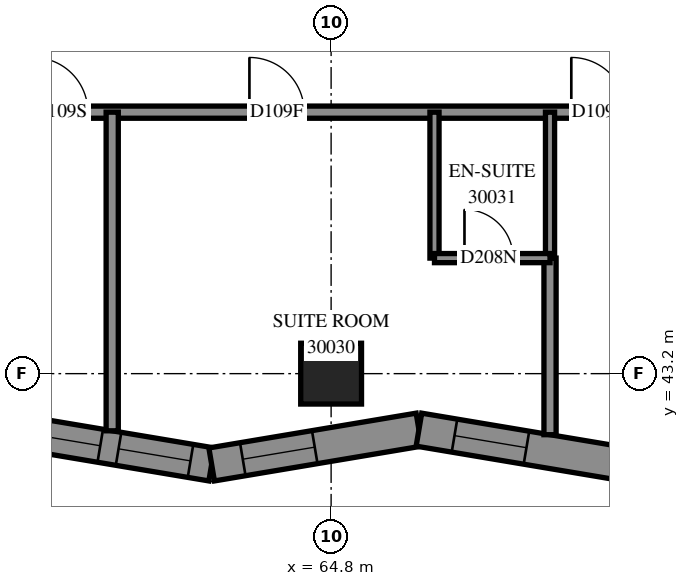
"""IFC4 building model, lengths in metres.
Left out: names, types, materials, properties, quantities, classifications, styles, units other than length and angle.
Written with IfcOpenShell. Run it as: python <this file> out.ifc"""

import sys

from ifc_helpers import new_model, si_unit, direction, frame, frame_2d, origin, origin_2d, place, context, subcontext, project, spatial, polyline, rectangle, outline, extrude, element, fill, save


model = new_model("IFC4")
c1 = context("Model", 3, precision=1e-05, world=origin(), true_north=direction((0.0, 1.0)))
c2 = subcontext(c1, "Body", "Model", "MODEL_VIEW")
j1 = project(units=[si_unit("LENGTHUNIT", "METRE"), si_unit("PLANEANGLEUNIT", "RADIAN")], contexts=[c1])
p1 = place(None, origin())
s1 = spatial("IfcSite", under=j1, at=p1, CompositionType="ELEMENT")
p2 = place(p1, origin())
s2 = spatial("IfcBuilding", under=s1, at=p2, CompositionType="ELEMENT")
p3 = place(p2, frame((0.0, 0.0, 111.8)))
s3 = spatial("IfcBuildingStorey", under=s2, at=p3, CompositionType="ELEMENT", Elevation=111.8)
p4 = place(p3, frame((64.8, 43.2, 0.0), z_axis=(0.0, 0.0, 1.0), x_axis=(1.0, 0.0, 0.0)))
e1 = element("IfcColumn", 1, at=p4, inside=s3, PredefinedType="COLUMN", context=c2, shape_type="SweptSolid", body=[
    extrude(rectangle(XDim=1.0, YDim=1.0, at=origin_2d()), origin(), (0.0, 0.0, 1.0), 3.1),
])
p5 = place(p3, frame((59.426, 42.279, 0.0), z_axis=(0.0, 0.0, 1.0), x_axis=(0.9862119159, -0.1654873316, 0.0)))
e2 = element("IfcWall", 2, at=p5, inside=s3, PredefinedType="SOLIDWALL", context=c2, shape_type="SweptSolid", body=[
    extrude(outline(polyline([(0.046, -0.275), (3.503, -0.275), (3.41, 0.275), (-0.046, 0.275), (0.046, -0.275)])), origin(), (0.0, 0.0, 1.0), 3.1),
])
p6 = place(p5, frame((0.399, 0.0, 0.5)))
e3 = element("IfcOpeningElement", 3, at=p6, cuts=e2, PredefinedType="OPENING", context=c2, shape_type="SweptSolid", body=[
    extrude(rectangle(XDim=1.2, YDim=2.45, at=frame_2d((0.6, 1.225))), frame((0.0, 0.285, 0.0), z_axis=(0.0, -1.0, 0.0), x_axis=(1.0, 0.0, 0.0)), (0.0, 0.0, 1.0), 0.57),
])
p7 = place(p5, frame((1.904, 0.0, 0.5)))
e4 = element("IfcOpeningElement", 4, at=p7, cuts=e2, PredefinedType="OPENING", context=c2, shape_type="SweptSolid", body=[
    extrude(rectangle(XDim=1.2, YDim=2.45, at=frame_2d((0.6, 1.225))), frame((0.0, 0.285, 0.0), z_axis=(0.0, -1.0, 0.0), x_axis=(1.0, 0.0, 0.0)), (0.0, 0.0, 1.0), 0.57),
])
p8 = place(p3, frame((62.835, 41.707, 0.0), z_axis=(0.0, 0.0, 1.0), x_axis=(0.9862119159, 0.1654873316, 0.0)))
e5 = element("IfcWall", 5, at=p8, inside=s3, PredefinedType="SOLIDWALL", context=c2, shape_type="SweptSolid", body=[
    extrude(outline(polyline([(-0.046, -0.275), (3.41, -0.275), (3.503, 0.275), (0.046, 0.275), (-0.046, -0.275)])), origin(), (0.0, 0.0, 1.0), 3.1),
])
p9 = place(p8, frame((0.519, 0.0, 0.5)))
e6 = element("IfcOpeningElement", 6, at=p9, cuts=e5, PredefinedType="OPENING", context=c2, shape_type="SweptSolid", body=[
    extrude(rectangle(XDim=1.2, YDim=2.45, at=frame_2d((0.6, 1.225))), frame((0.0, 0.285, 0.0), z_axis=(0.0, -1.0, 0.0), x_axis=(1.0, 0.0, 0.0)), (0.0, 0.0, 1.0), 0.57),
])
p10 = place(p3, frame((66.244, 42.279, 0.0), z_axis=(0.0, 0.0, 1.0), x_axis=(0.9862119159, -0.1654873316, 0.0)))
e7 = element("IfcWall", 7, at=p10, inside=s3, PredefinedType="SOLIDWALL", context=c2, shape_type="SweptSolid", body=[
    extrude(outline(polyline([(0.046, -0.275), (3.503, -0.275), (3.41, 0.275), (-0.046, 0.275), (0.046, -0.275)])), origin(), (0.0, 0.0, 1.0), 3.1),
])
p11 = place(p10, frame((0.593, 0.0, 0.5)))
e8 = element("IfcOpeningElement", 8, at=p11, cuts=e7, PredefinedType="OPENING", context=c2, shape_type="SweptSolid", body=[
    extrude(rectangle(XDim=1.2, YDim=2.45, at=frame_2d((0.6, 1.225))), frame((0.0, 0.285, 0.0), z_axis=(0.0, -1.0, 0.0), x_axis=(1.0, 0.0, 0.0)), (0.0, 0.0, 1.0), 0.57),
])
p12 = place(p3, frame((54.7, 47.5, 0.0), z_axis=(0.0, 0.0, 1.0), x_axis=(1.0, 0.0, 0.0)))
e9 = element("IfcWall", 9, at=p12, inside=s3, PredefinedType="PARTITIONING", context=c2, shape_type="SweptSolid", body=[
    extrude(rectangle(XDim=19.442, YDim=0.2, at=frame_2d((9.721, 0.0))), origin(), (0.0, 0.0, 1.0), 3.1),
])
p13 = place(p12, frame((5.2, 0.0, 0.0)))
e10 = element("IfcOpeningElement", 10, at=p13, cuts=e9, PredefinedType="OPENING", context=c2, shape_type="SweptSolid", body=[
    extrude(rectangle(XDim=0.9, YDim=2.1, at=frame_2d((0.45, 1.05))), frame((0.0, 0.11, 0.0), z_axis=(0.0, -1.0, 0.0), x_axis=(1.0, 0.0, 0.0)), (0.0, 0.0, 1.0), 0.22),
])
p14 = place(p12, frame((8.757, 0.0, 0.0)))
e11 = element("IfcOpeningElement", 11, at=p14, cuts=e9, PredefinedType="OPENING", context=c2, shape_type="SweptSolid", body=[
    extrude(rectangle(XDim=0.9, YDim=2.1, at=frame_2d((0.45, 1.05))), frame((0.0, 0.11, 0.0), z_axis=(0.0, -1.0, 0.0), x_axis=(1.0, 0.0, 0.0)), (0.0, 0.0, 1.0), 0.22),
])
p15 = place(p12, frame((14.05, 0.0, 0.0)))
e12 = element("IfcOpeningElement", 12, at=p15, cuts=e9, PredefinedType="OPENING", context=c2, shape_type="SweptSolid", body=[
    extrude(rectangle(XDim=0.9, YDim=2.1, at=frame_2d((0.45, 1.05))), frame((0.0, 0.11, 0.0), z_axis=(0.0, -1.0, 0.0), x_axis=(1.0, 0.0, 0.0)), (0.0, 0.0, 1.0), 0.22),
])
p16 = place(p3, frame((61.2, 42.26, 0.0), z_axis=(0.0, 0.0, 1.0), x_axis=(0.0, 1.0, 0.0)))
e13 = element("IfcWall", 13, at=p16, inside=s3, PredefinedType="PARTITIONING", context=c2, shape_type="SweptSolid", body=[
    extrude(rectangle(XDim=5.24, YDim=0.2, at=frame_2d((2.62, 0.0))), origin(), (0.0, 0.0, 1.0), 3.1),
])
p17 = place(p3, frame((68.4, 42.196, 0.0), z_axis=(0.0, 0.0, 1.0), x_axis=(0.0, 1.0, 0.0)))
e14 = element("IfcWall", 14, at=p17, inside=s3, PredefinedType="PARTITIONING", context=c2, shape_type="SweptSolid", body=[
    extrude(rectangle(XDim=2.904, YDim=0.2, at=frame_2d((1.452, 0.0))), origin(), (0.0, 0.0, 1.0), 3.1),
])
for number, where, z_axis, x_axis in (
    (15, (66.5, 45.1, 0.0), (0.0, 0.0, 1.0), (0.0, 1.0, 0.0)),
    (16, (68.4, 45.1, 0.0), (0.0, 0.0, 1.0), (0.0, 1.0, 0.0)),
):
    element("IfcWall", number, at=place(p3, frame(where, z_axis=z_axis, x_axis=x_axis)), inside=s3, PredefinedType="PARTITIONING", context=c2, shape_type="SweptSolid", body=[
        extrude(rectangle(XDim=2.4, YDim=0.15, at=frame_2d((1.2, 0.0))), origin(), (0.0, 0.0, 1.0), 3.1),
    ])
p18 = place(p3, frame((66.5, 45.1, 0.0), z_axis=(0.0, 0.0, 1.0), x_axis=(1.0, 0.0, 0.0)))
e17 = element("IfcWall", 17, at=p18, inside=s3, PredefinedType="PARTITIONING", context=c2, shape_type="SweptSolid", body=[
    extrude(rectangle(XDim=1.9, YDim=0.15, at=frame_2d((0.95, 0.0))), origin(), (0.0, 0.0, 1.0), 3.1),
])
p19 = place(p18, frame((0.493, 0.0, 0.0)))
e18 = element("IfcOpeningElement", 18, at=p19, cuts=e17, PredefinedType="OPENING", context=c2, shape_type="SweptSolid", body=[
    extrude(rectangle(XDim=0.8, YDim=2.1, at=frame_2d((0.4, 1.05))), frame((0.0, 0.085, 0.0), z_axis=(0.0, -1.0, 0.0), x_axis=(1.0, 0.0, 0.0)), (0.0, 0.0, 1.0), 0.17),
])
p20 = place(p6, origin())
e19 = element("IfcWindow", 19, at=p20, inside=s3, PartitioningType="SINGLE_PANEL", PredefinedType="WINDOW", context=c2, shape_type="SweptSolid", body=[
    extrude(rectangle(XDim=1.2, YDim=2.45, at=frame_2d((0.6, 1.225))), frame((0.0, 0.155, 0.0), z_axis=(0.0, -1.0, 0.0), x_axis=(1.0, 0.0, 0.0)), (0.0, 0.0, 1.0), 0.06),
])
fill(e3, e19)
p21 = place(p7, origin())
e20 = element("IfcWindow", 20, at=p21, inside=s3, PartitioningType="SINGLE_PANEL", PredefinedType="WINDOW", context=c2, shape_type="SweptSolid", body=[
    extrude(rectangle(XDim=1.2, YDim=2.45, at=frame_2d((0.6, 1.225))), frame((0.0, 0.155, 0.0), z_axis=(0.0, -1.0, 0.0), x_axis=(1.0, 0.0, 0.0)), (0.0, 0.0, 1.0), 0.06),
])
fill(e4, e20)
p22 = place(p9, origin())
e21 = element("IfcWindow", 21, at=p22, inside=s3, PartitioningType="SINGLE_PANEL", PredefinedType="WINDOW", context=c2, shape_type="SweptSolid", body=[
    extrude(rectangle(XDim=1.2, YDim=2.45, at=frame_2d((0.6, 1.225))), frame((0.0, 0.155, 0.0), z_axis=(0.0, -1.0, 0.0), x_axis=(1.0, 0.0, 0.0)), (0.0, 0.0, 1.0), 0.06),
])
fill(e6, e21)
p23 = place(p11, origin())
e22 = element("IfcWindow", 22, at=p23, inside=s3, PartitioningType="SINGLE_PANEL", PredefinedType="WINDOW", context=c2, shape_type="SweptSolid", body=[
    extrude(rectangle(XDim=1.2, YDim=2.45, at=frame_2d((0.6, 1.225))), frame((0.0, 0.155, 0.0), z_axis=(0.0, -1.0, 0.0), x_axis=(1.0, 0.0, 0.0)), (0.0, 0.0, 1.0), 0.06),
])
fill(e8, e22)
p24 = place(p13, origin())
e23 = element("IfcDoor", 23, at=p24, inside=s3, OperationType="SINGLE_SWING_LEFT", PredefinedType="DOOR", context=c2, shape_type="SweptSolid", body=[
    extrude(rectangle(XDim=0.9, YDim=2.1, at=frame_2d((0.45, 1.05))), frame((0.0, 0.025, 0.0), z_axis=(0.0, -1.0, 0.0), x_axis=(1.0, 0.0, 0.0)), (0.0, 0.0, 1.0), 0.05),
])
fill(e10, e23)
p25 = place(p14, origin())
e24 = element("IfcDoor", 24, at=p25, inside=s3, OperationType="SINGLE_SWING_RIGHT", PredefinedType="DOOR", context=c2, shape_type="SweptSolid", body=[
    extrude(rectangle(XDim=0.9, YDim=2.1, at=frame_2d((0.45, 1.05))), frame((0.0, 0.025, 0.0), z_axis=(0.0, -1.0, 0.0), x_axis=(1.0, 0.0, 0.0)), (0.0, 0.0, 1.0), 0.05),
])
fill(e11, e24)
p26 = place(p19, origin())
e25 = element("IfcDoor", 25, at=p26, inside=s3, OperationType="SINGLE_SWING_RIGHT", PredefinedType="DOOR", context=c2, shape_type="SweptSolid", body=[
    extrude(rectangle(XDim=0.8, YDim=2.1, at=frame_2d((0.4, 1.05))), frame((0.0, 0.025, 0.0), z_axis=(0.0, -1.0, 0.0), x_axis=(1.0, 0.0, 0.0)), (0.0, 0.0, 1.0), 0.05),
])
fill(e18, e25)
p27 = place(p15, origin())
e26 = element("IfcDoor", 26, at=p27, inside=s3, OperationType="SINGLE_SWING_RIGHT", PredefinedType="DOOR", context=c2, shape_type="SweptSolid", body=[
    extrude(rectangle(XDim=0.9, YDim=2.1, at=frame_2d((0.45, 1.05))), frame((0.0, 0.025, 0.0), z_axis=(0.0, -1.0, 0.0), x_axis=(1.0, 0.0, 0.0)), (0.0, 0.0, 1.0), 0.05),
])
fill(e12, e26)
save(model, sys.argv[1])
